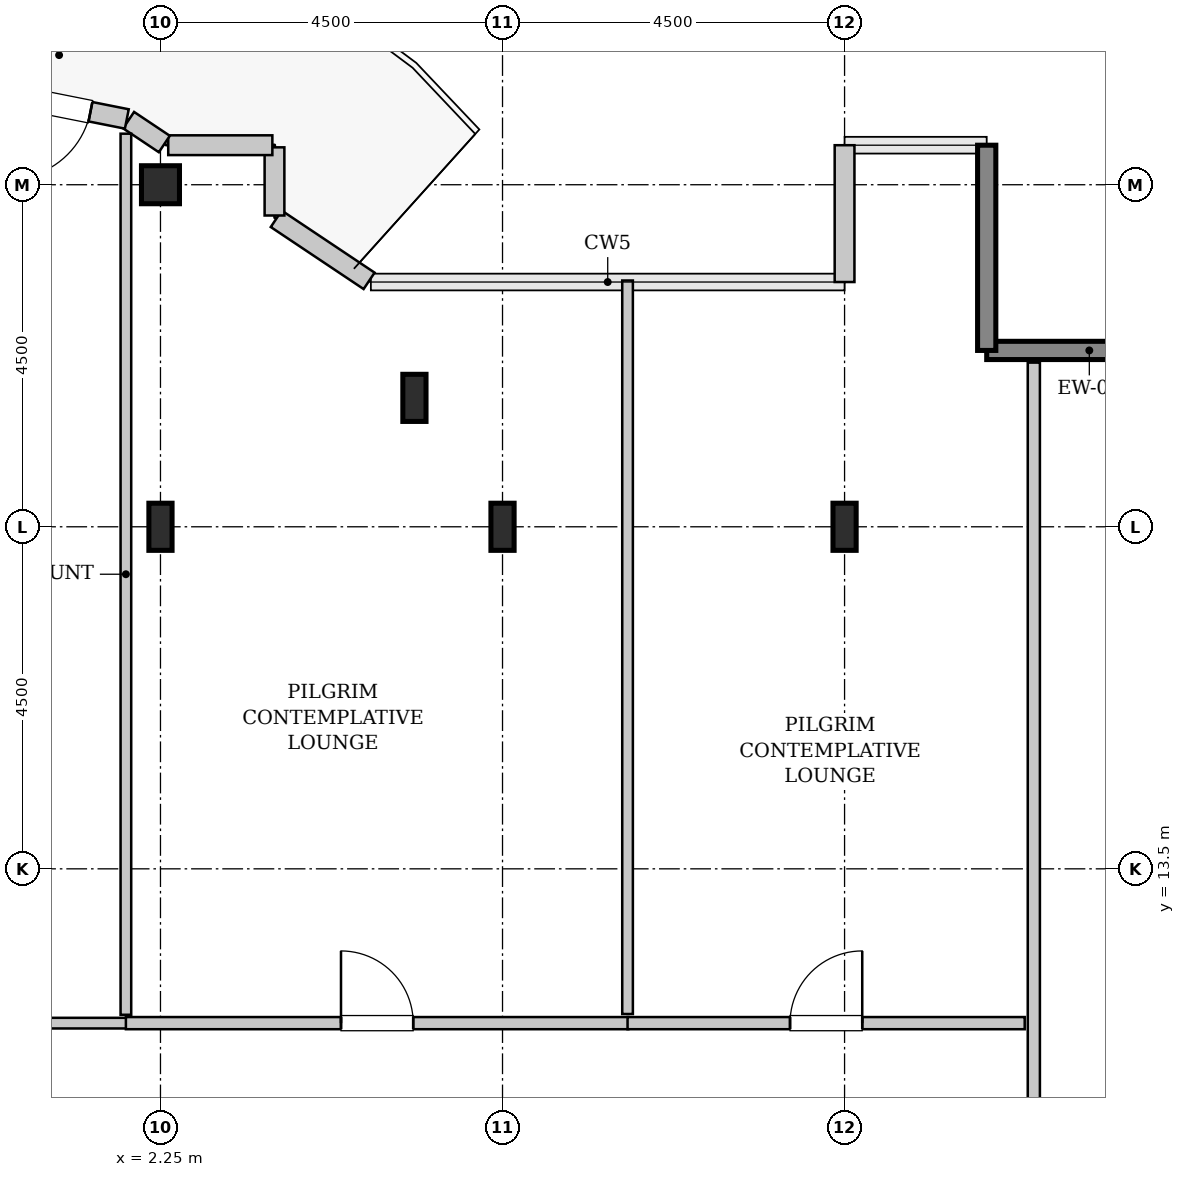
"""IFC4 building model, lengths in metres.
Left out: names, types, materials, properties, quantities, classifications, styles, units other than length and angle.
Written with IfcOpenShell. Run it as: python <this file> out.ifc"""

import sys

from ifc_helpers import new_model, si_unit, direction, frame, frame_2d, origin, origin_2d, place, context, subcontext, project, spatial, rectangle, hollow_rectangle, i_section, extrude, source, transform, mapped, element, fill, save


model = new_model("IFC4")
c1 = context("Model", 3, precision=1e-05, world=origin(), true_north=direction((0.0, 1.0)))
c2 = subcontext(c1, "Body", "Model", "MODEL_VIEW")
j1 = project(units=[si_unit("LENGTHUNIT", "METRE"), si_unit("PLANEANGLEUNIT", "RADIAN")], contexts=[c1])
p1 = place(None, origin())
s1 = spatial("IfcSite", under=j1, at=p1, CompositionType="ELEMENT")
p2 = place(p1, origin())
s2 = spatial("IfcBuilding", under=s1, at=p2, CompositionType="ELEMENT")
p3 = place(p2, frame((0.0, 0.0, 302.6)))
s3 = spatial("IfcBuildingStorey", under=s2, at=p3, CompositionType="ELEMENT", Elevation=302.6)
m1 = source(origin(), c2, "Body", "SweptSolid", [
    extrude(i_section(OverallWidth=0.305, OverallDepth=0.62, WebThickness=0.021, FlangeThickness=0.04, FilletRadius=0.027, at=origin_2d()), origin(), (0.0, 0.0, 1.0), 3.8),
])
p4 = place(p3, frame((2.25, 18.0, 0.0), z_axis=(0.0, 0.0, 1.0), x_axis=(1.0, 0.0, 0.0)))
e1 = element("IfcColumn", 1, at=p4, inside=s3, PredefinedType="COLUMN", context=c2, shape_type="MappedRepresentation", body=[
    mapped(m1, transform((0.0, 0.0, 0.0), x_axis=(1.0, 0.0, 0.0), y_axis=(0.0, 1.0, 0.0), z_axis=(0.0, 0.0, 1.0), scale=1.0)),
])
m2 = source(origin(), c2, "Body", "SweptSolid", [
    extrude(hollow_rectangle(XDim=0.5, YDim=0.5, WallThickness=0.025, InnerFilletRadius=0.025, OuterFilletRadius=0.05, at=origin_2d()), origin(), (0.0, 0.0, 1.0), 3.8),
])
p5 = place(p3, frame((2.25, 22.5, 0.0), z_axis=(0.0, 0.0, 1.0), x_axis=(1.0, 0.0, 0.0)))
e2 = element("IfcColumn", 2, at=p5, inside=s3, PredefinedType="COLUMN", context=c2, shape_type="MappedRepresentation", body=[
    mapped(m2, transform((0.0, 0.0, 0.0), x_axis=(1.0, 0.0, 0.0), y_axis=(0.0, 1.0, 0.0), z_axis=(0.0, 0.0, 1.0), scale=1.0)),
])
for number, where, z_axis, x_axis in (
    (3, (5.591, 19.696, 0.0), (0.0, 0.0, 1.0), (1.0, 0.0, 0.0)),
    (4, (6.75, 18.0, 0.0), (0.0, 0.0, 1.0), (1.0, 0.0, 0.0)),
    (5, (11.25, 18.0, 0.0), (0.0, 0.0, 1.0), (1.0, 0.0, 0.0)),
):
    element("IfcColumn", number, at=place(p3, frame(where, z_axis=z_axis, x_axis=x_axis)), inside=s3, PredefinedType="COLUMN", context=c2, shape_type="MappedRepresentation", body=[
        mapped(m1, transform((0.0, 0.0, 0.0), x_axis=(1.0, 0.0, 0.0), y_axis=(0.0, 1.0, 0.0), z_axis=(0.0, 0.0, 1.0), scale=1.0)),
    ])
m3 = source(origin(), c2, "Body", "SweptSolid", [
    extrude(rectangle(XDim=2.7, YDim=0.24, at=frame_2d((1.35, 0.0))), origin(), (0.0, 0.0, 1.0), 3.55),
])
for number, where, z_axis, x_axis in (
    (6, (15.82, 20.32, 0.0), (0.0, 0.0, 1.0), (-1.0, 0.0, 0.0)),
    (7, (13.12, 20.32, 0.0), (0.0, 0.0, 1.0), (0.0, 1.0, 0.0)),
):
    element("IfcWall", number, at=place(p3, frame(where, z_axis=z_axis, x_axis=x_axis)), inside=s3, PredefinedType="SHEAR", context=c2, shape_type="MappedRepresentation", body=[
        mapped(m3, transform((0.0, 0.0, 0.0), x_axis=(1.0, 0.0, 0.0), y_axis=(0.0, 1.0, 0.0), z_axis=(0.0, 0.0, 1.0), scale=1.0)),
    ])
m4 = source(origin(), c2, "Body", "SweptSolid", [
    extrude(rectangle(XDim=1.8, YDim=0.26, at=frame_2d((0.9, 0.0))), origin(), (0.0, 0.0, 1.0), 3.55),
])
p6 = place(p3, frame((11.25, 23.02, 0.0), z_axis=(0.0, 0.0, 1.0), x_axis=(0.0, -1.0, 0.0)))
e8 = element("IfcWall", 8, at=p6, inside=s3, PredefinedType="SOLIDWALL", context=c2, shape_type="MappedRepresentation", body=[
    mapped(m4, transform((0.0, 0.0, 0.0), x_axis=(1.0, 0.0, 0.0), y_axis=(0.0, 1.0, 0.0), z_axis=(0.0, 0.0, 1.0), scale=1.0)),
])
m5 = source(origin(), c2, "Body", "SweptSolid", [
    extrude(rectangle(XDim=1.469, YDim=0.26, at=frame_2d((0.734, 0.0))), origin(), (0.0, 0.0, 1.0), 3.55),
])
p7 = place(p3, frame((4.995, 21.236, 0.0), z_axis=(0.0, 0.0, 1.0), x_axis=(-0.831461760506, 0.555581983884, 0.0)))
e9 = element("IfcWall", 9, at=p7, inside=s3, PredefinedType="SOLIDWALL", context=c2, shape_type="MappedRepresentation", body=[
    mapped(m5, transform((0.0, 0.0, 0.0), x_axis=(1.0, 0.0, 0.0), y_axis=(0.0, 1.0, 0.0), z_axis=(0.0, 0.0, 1.0), scale=1.0)),
])
m6 = source(origin(), c2, "Body", "SweptSolid", [
    extrude(rectangle(XDim=0.897, YDim=0.26, at=frame_2d((0.448, 0.0))), origin(), (0.0, 0.0, 1.0), 3.55),
])
p8 = place(p3, frame((3.75, 22.095, 0.0), z_axis=(0.0, 0.0, 1.0), x_axis=(0.0, 1.0, 0.0)))
e10 = element("IfcWall", 10, at=p8, inside=s3, PredefinedType="SOLIDWALL", context=c2, shape_type="MappedRepresentation", body=[
    mapped(m6, transform((0.0, 0.0, 0.0), x_axis=(1.0, 0.0, 0.0), y_axis=(0.0, 1.0, 0.0), z_axis=(0.0, 0.0, 1.0), scale=1.0)),
])
m7 = source(origin(), c2, "Body", "SweptSolid", [
    extrude(rectangle(XDim=1.37, YDim=0.26, at=frame_2d((0.685, 0.0))), origin(), (0.0, 0.0, 1.0), 3.55),
])
p9 = place(p3, frame((3.722, 23.02, 0.0), z_axis=(0.0, 0.0, 1.0), x_axis=(-1.0, 0.0, 0.0)))
e11 = element("IfcWall", 11, at=p9, inside=s3, PredefinedType="SOLIDWALL", context=c2, shape_type="MappedRepresentation", body=[
    mapped(m7, transform((0.0, 0.0, 0.0), x_axis=(1.0, 0.0, 0.0), y_axis=(0.0, 1.0, 0.0), z_axis=(0.0, 0.0, 1.0), scale=1.0)),
])
m8 = source(origin(), c2, "Body", "SweptSolid", [
    extrude(rectangle(XDim=0.565, YDim=0.26, at=frame_2d((0.283, 0.0))), origin(), (0.0, 0.0, 1.0), 3.55),
])
p10 = place(p3, frame((2.301, 23.036, 0.0), z_axis=(0.0, 0.0, 1.0), x_axis=(-0.831651492666, 0.555297933317, 0.0)))
e12 = element("IfcWall", 12, at=p10, inside=s3, PredefinedType="SOLIDWALL", context=c2, shape_type="MappedRepresentation", body=[
    mapped(m8, transform((0.0, 0.0, 0.0), x_axis=(1.0, 0.0, 0.0), y_axis=(0.0, 1.0, 0.0), z_axis=(0.0, 0.0, 1.0), scale=1.0)),
])
m9 = source(origin(), c2, "Body", "SweptSolid", [
    extrude(rectangle(XDim=4.137, YDim=0.26, at=frame_2d((2.068, 0.0))), origin(), (0.0, 0.0, 1.0), 3.55),
])
p11 = place(p3, frame((1.807, 23.365, 0.0), z_axis=(0.0, 0.0, 1.0), x_axis=(-0.980782170794, 0.195105954428, 0.0)))
e13 = element("IfcWall", 13, at=p11, inside=s3, PredefinedType="SOLIDWALL", context=c2, shape_type="MappedRepresentation", body=[
    mapped(m9, transform((0.0, 0.0, 0.0), x_axis=(1.0, 0.0, 0.0), y_axis=(0.0, 1.0, 0.0), z_axis=(0.0, 0.0, 1.0), scale=1.0)),
])
p12 = place(p11, frame((0.488, 0.0, 0.0)))
e14 = element("IfcOpeningElement", 14, at=p12, cuts=e13, PredefinedType="OPENING", context=c2, shape_type="SweptSolid", body=[
    extrude(rectangle(XDim=1.1, YDim=2.2, at=frame_2d((0.55, 1.1))), frame((0.0, 0.14, 0.0), z_axis=(0.0, -1.0, 0.0), x_axis=(1.0, 0.0, 0.0)), (0.0, 0.0, 1.0), 0.28),
])
m10 = source(origin(), c2, "Body", "SweptSolid", [
    extrude(rectangle(XDim=12.922, YDim=0.16, at=frame_2d((6.461, 0.0))), origin(), (0.0, 0.0, 1.0), 3.535),
])
p13 = place(p3, frame((13.74, 7.238, 0.0), z_axis=(0.0, 0.0, 1.0), x_axis=(0.0, 1.0, 0.0)))
e15 = element("IfcWall", 15, at=p13, inside=s3, PredefinedType="PARTITIONING", context=c2, shape_type="MappedRepresentation", body=[
    mapped(m10, transform((0.0, 0.0, 0.0), x_axis=(1.0, 0.0, 0.0), y_axis=(0.0, 1.0, 0.0), z_axis=(0.0, 0.0, 1.0), scale=1.0)),
])
p14 = place(p13, frame((1.661, 0.0, 0.0)))
e16 = element("IfcOpeningElement", 16, at=p14, cuts=e15, PredefinedType="OPENING", context=c2, shape_type="SweptSolid", body=[
    extrude(rectangle(XDim=0.95, YDim=2.1, at=frame_2d((0.475, 1.05))), frame((0.0, 0.09, 0.0), z_axis=(0.0, -1.0, 0.0), x_axis=(1.0, 0.0, 0.0)), (0.0, 0.0, 1.0), 0.18),
])
m11 = source(origin(), c2, "Body", "SweptSolid", [
    extrude(rectangle(XDim=4.625, YDim=0.14, at=frame_2d((2.312, 0.0))), origin(), (0.0, 0.0, 1.0), 3.535),
])
p15 = place(p3, frame((-2.82, 11.47, 0.0), z_axis=(0.0, 0.0, 1.0), x_axis=(1.0, 0.0, 0.0)))
e17 = element("IfcWall", 17, at=p15, inside=s3, PredefinedType="PARTITIONING", context=c2, shape_type="MappedRepresentation", body=[
    mapped(m11, transform((0.0, 0.0, 0.0), x_axis=(1.0, 0.0, 0.0), y_axis=(0.0, 1.0, 0.0), z_axis=(0.0, 0.0, 1.0), scale=1.0)),
])
m12 = source(origin(), c2, "Body", "SweptSolid", [
    extrude(rectangle(XDim=11.591, YDim=0.14, at=frame_2d((5.796, 0.0))), origin(), (0.0, 0.0, 1.0), 2.975),
])
p16 = place(p3, frame((1.795, 11.58, 0.0), z_axis=(0.0, 0.0, 1.0), x_axis=(0.0, 1.0, 0.0)))
e18 = element("IfcWall", 18, at=p16, inside=s3, PredefinedType="PARTITIONING", context=c2, shape_type="MappedRepresentation", body=[
    mapped(m12, transform((0.0, 0.0, 0.0), x_axis=(1.0, 0.0, 0.0), y_axis=(0.0, 1.0, 0.0), z_axis=(0.0, 0.0, 1.0), scale=1.0)),
])
m13 = source(origin(), c2, "Body", "SweptSolid", [
    extrude(rectangle(XDim=6.61, YDim=0.16, at=frame_2d((3.305, 0.0))), origin(), (0.0, 0.0, 1.0), 3.535),
])
p17 = place(p3, frame((1.795, 11.47, 0.0), z_axis=(0.0, 0.0, 1.0), x_axis=(1.0, 0.0, 0.0)))
e19 = element("IfcWall", 19, at=p17, inside=s3, PredefinedType="PARTITIONING", context=c2, shape_type="MappedRepresentation", body=[
    mapped(m13, transform((0.0, 0.0, 0.0), x_axis=(1.0, 0.0, 0.0), y_axis=(0.0, 1.0, 0.0), z_axis=(0.0, 0.0, 1.0), scale=1.0)),
])
p18 = place(p17, frame((2.83, 0.0, 0.0)))
e20 = element("IfcOpeningElement", 20, at=p18, cuts=e19, PredefinedType="OPENING", context=c2, shape_type="SweptSolid", body=[
    extrude(rectangle(XDim=0.95, YDim=2.1, at=frame_2d((0.475, 1.05))), frame((0.0, 0.09, 0.0), z_axis=(0.0, -1.0, 0.0), x_axis=(1.0, 0.0, 0.0)), (0.0, 0.0, 1.0), 0.18),
])
m14 = source(origin(), c2, "Body", "SweptSolid", [
    extrude(rectangle(XDim=9.65, YDim=0.14, at=frame_2d((4.825, 0.0))), origin(), (0.0, 0.0, 1.0), 3.535),
])
p19 = place(p3, frame((8.395, 11.59, 0.0), z_axis=(0.0, 0.0, 1.0), x_axis=(0.0, 1.0, 0.0)))
e21 = element("IfcWall", 21, at=p19, inside=s3, PredefinedType="PARTITIONING", context=c2, shape_type="MappedRepresentation", body=[
    mapped(m14, transform((0.0, 0.0, 0.0), x_axis=(1.0, 0.0, 0.0), y_axis=(0.0, 1.0, 0.0), z_axis=(0.0, 0.0, 1.0), scale=1.0)),
])
m15 = source(origin(), c2, "Body", "SweptSolid", [
    extrude(rectangle(XDim=5.225, YDim=0.16, at=frame_2d((2.613, 0.0))), origin(), (0.0, 0.0, 1.0), 3.535),
])
p20 = place(p3, frame((8.395, 11.47, 0.0), z_axis=(0.0, 0.0, 1.0), x_axis=(1.0, 0.0, 0.0)))
e22 = element("IfcWall", 22, at=p20, inside=s3, PredefinedType="PARTITIONING", context=c2, shape_type="MappedRepresentation", body=[
    mapped(m15, transform((0.0, 0.0, 0.0), x_axis=(1.0, 0.0, 0.0), y_axis=(0.0, 1.0, 0.0), z_axis=(0.0, 0.0, 1.0), scale=1.0)),
])
p21 = place(p20, frame((2.137, 0.0, 0.0)))
e23 = element("IfcOpeningElement", 23, at=p21, cuts=e22, PredefinedType="OPENING", context=c2, shape_type="SweptSolid", body=[
    extrude(rectangle(XDim=0.95, YDim=2.1, at=frame_2d((0.475, 1.05))), frame((0.0, 0.09, 0.0), z_axis=(0.0, -1.0, 0.0), x_axis=(1.0, 0.0, 0.0)), (0.0, 0.0, 1.0), 0.18),
])
m16 = source(origin(), c2, "Body", "SweptSolid", [
    extrude(rectangle(XDim=1.1, YDim=2.2, at=frame_2d((0.55, 1.1))), frame((0.0, 0.025, 0.0), z_axis=(0.0, -1.0, 0.0), x_axis=(1.0, 0.0, 0.0)), (0.0, 0.0, 1.0), 0.05),
])
p22 = place(p12, origin())
e24 = element("IfcDoor", 24, at=p22, inside=s3, OperationType="SINGLE_SWING_RIGHT", PredefinedType="DOOR", context=c2, shape_type="MappedRepresentation", body=[
    mapped(m16, transform((0.0, 0.0, 0.0), x_axis=(1.0, 0.0, 0.0), y_axis=(0.0, 1.0, 0.0), z_axis=(0.0, 0.0, 1.0), scale=1.0)),
])
fill(e14, e24)
m17 = source(origin(), c2, "Body", "SweptSolid", [
    extrude(rectangle(XDim=0.95, YDim=2.1, at=frame_2d((0.475, 1.05))), frame((0.0, 0.025, 0.0), z_axis=(0.0, -1.0, 0.0), x_axis=(1.0, 0.0, 0.0)), (0.0, 0.0, 1.0), 0.05),
])
p23 = place(p18, origin())
e25 = element("IfcDoor", 25, at=p23, inside=s3, OperationType="SINGLE_SWING_LEFT", PredefinedType="DOOR", context=c2, shape_type="MappedRepresentation", body=[
    mapped(m17, transform((0.0, 0.0, 0.0), x_axis=(1.0, 0.0, 0.0), y_axis=(0.0, 1.0, 0.0), z_axis=(0.0, 0.0, 1.0), scale=1.0)),
])
fill(e20, e25)
p24 = place(p21, origin())
e26 = element("IfcDoor", 26, at=p24, inside=s3, OperationType="SINGLE_SWING_RIGHT", PredefinedType="DOOR", context=c2, shape_type="MappedRepresentation", body=[
    mapped(m17, transform((0.0, 0.0, 0.0), x_axis=(1.0, 0.0, 0.0), y_axis=(0.0, 1.0, 0.0), z_axis=(0.0, 0.0, 1.0), scale=1.0)),
])
fill(e23, e26)
save(model, sys.argv[1])
